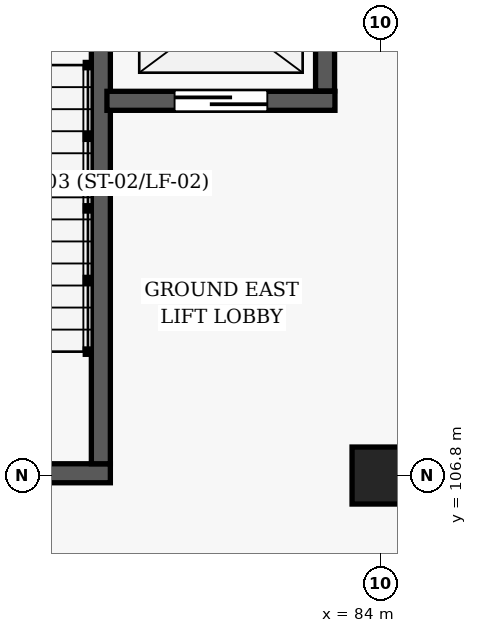
"""IFC4 building model, lengths in metres.
Left out: names, types, materials, properties, quantities, classifications, styles, units other than length and angle.
Written with IfcOpenShell. Run it as: python <this file> out.ifc"""

import sys

from ifc_helpers import new_model, si_unit, direction, frame, frame_2d, origin, origin_2d, place, context, subcontext, project, spatial, rectangle, extrude, element, fill, save


model = new_model("IFC4")
c1 = context("Model", 3, precision=1e-05, world=origin(), true_north=direction((0.0, 1.0)))
c2 = subcontext(c1, "Body", "Model", "MODEL_VIEW")
j1 = project(units=[si_unit("LENGTHUNIT", "METRE"), si_unit("PLANEANGLEUNIT", "RADIAN")], contexts=[c1])
p1 = place(None, origin())
s1 = spatial("IfcSite", under=j1, at=p1, CompositionType="ELEMENT")
p2 = place(p1, origin())
s2 = spatial("IfcBuilding", under=s1, at=p2, CompositionType="ELEMENT")
p3 = place(p2, origin())
s3 = spatial("IfcBuildingStorey", under=s2, at=p3, CompositionType="ELEMENT", Elevation=0.0)
p4 = place(p3, frame((84.0, 106.8, 0.0), z_axis=(0.0, 0.0, 1.0), x_axis=(1.0, 0.0, 0.0)))
e1 = element("IfcColumn", 1, at=p4, inside=s3, PredefinedType="COLUMN", context=c2, shape_type="SweptSolid", body=[
    extrude(rectangle(XDim=0.75, YDim=0.75, at=origin_2d()), origin(), (0.0, 0.0, 1.0), 4.8),
])
p5 = place(p3, frame((80.445, 106.83, 0.0), z_axis=(0.0, 0.0, 1.0), x_axis=(-1.0, 0.0, 0.0)))
e2 = element("IfcWall", 2, at=p5, inside=s3, PredefinedType="SHEAR", context=c2, shape_type="SweptSolid", body=[
    extrude(rectangle(XDim=3.61, YDim=0.25, at=frame_2d((1.805, 0.0))), origin(), (0.0, 0.0, 1.0), 4.56),
])
p6 = place(p5, frame((1.235, 0.0, 0.0)))
e3 = element("IfcOpeningElement", 3, at=p6, cuts=e2, PredefinedType="OPENING", context=c2, shape_type="SweptSolid", body=[
    extrude(rectangle(XDim=1.14, YDim=2.15, at=frame_2d((0.57, 1.075))), frame((0.0, 0.135, 0.0), z_axis=(0.0, -1.0, 0.0), x_axis=(1.0, 0.0, 0.0)), (0.0, 0.0, 1.0), 0.27),
])
p7 = place(p3, frame((80.32, 114.345, 0.0), z_axis=(0.0, 0.0, 1.0), x_axis=(0.0, -1.0, 0.0)))
e4 = element("IfcWall", 4, at=p7, inside=s3, PredefinedType="SHEAR", context=c2, shape_type="SweptSolid", body=[
    extrude(rectangle(XDim=7.39, YDim=0.25, at=frame_2d((3.695, 0.0))), origin(), (0.0, 0.0, 1.0), 4.56),
])
p8 = place(p3, frame((80.4, 111.73, 0.0), z_axis=(0.0, 0.0, 1.0), x_axis=(1.0, 0.0, 0.0)))
e5 = element("IfcWall", 5, at=p8, inside=s3, PredefinedType="SHEAR", context=c2, shape_type="SweptSolid", body=[
    extrude(rectangle(XDim=3.0, YDim=0.25, at=frame_2d((1.5, 0.0))), origin(), (0.0, 0.0, 1.0), 4.56),
])
p9 = place(p8, frame((0.89, 0.0, 0.0)))
e6 = element("IfcOpeningElement", 6, at=p9, cuts=e5, PredefinedType="OPENING", context=c2, shape_type="SweptSolid", body=[
    extrude(rectangle(XDim=1.22, YDim=2.18, at=frame_2d((0.61, 1.09))), frame((0.0, 0.135, 0.0), z_axis=(0.0, -1.0, 0.0), x_axis=(1.0, 0.0, 0.0)), (0.0, 0.0, 1.0), 0.27),
])
p10 = place(p3, frame((83.27, 111.86, 0.0), z_axis=(0.0, 0.0, 1.0), x_axis=(0.0, 1.0, 0.0)))
e7 = element("IfcWall", 7, at=p10, inside=s3, PredefinedType="SHEAR", context=c2, shape_type="SweptSolid", body=[
    extrude(rectangle(XDim=2.08, YDim=0.25, at=frame_2d((1.04, 0.0))), origin(), (0.0, 0.0, 1.0), 4.56),
])
p11 = place(p3, frame((84.2, 106.8, 0.0), z_axis=(0.0, 0.0, 1.0), x_axis=(1.0, 0.0, 0.0)))
e8 = element("IfcWall", 8, at=p11, inside=s3, PredefinedType="PARTITIONING", context=c2, shape_type="SweptSolid", body=[
    extrude(rectangle(XDim=28.53, YDim=0.18, at=frame_2d((14.265, 0.0))), origin(), (0.0, 0.0, 1.0), 3.675),
])
p12 = place(p11, frame((6.033, 0.0, 0.0)))
e9 = element("IfcOpeningElement", 9, at=p12, cuts=e8, PredefinedType="OPENING", context=c2, shape_type="SweptSolid", body=[
    extrude(rectangle(XDim=1.3, YDim=2.2, at=frame_2d((0.65, 1.1))), frame((0.0, 0.1, 0.0), z_axis=(0.0, -1.0, 0.0), x_axis=(1.0, 0.0, 0.0)), (0.0, 0.0, 1.0), 0.2),
])
p13 = place(p11, frame((13.515, 0.0, 0.0)))
e10 = element("IfcOpeningElement", 10, at=p13, cuts=e8, PredefinedType="OPENING", context=c2, shape_type="SweptSolid", body=[
    extrude(rectangle(XDim=1.5, YDim=2.25, at=frame_2d((0.75, 1.125))), frame((0.0, 0.1, 0.0), z_axis=(0.0, -1.0, 0.0), x_axis=(1.0, 0.0, 0.0)), (0.0, 0.0, 1.0), 0.2),
])
p14 = place(p11, frame((20.777, 0.0, 0.0)))
e11 = element("IfcOpeningElement", 11, at=p14, cuts=e8, PredefinedType="OPENING", context=c2, shape_type="SweptSolid", body=[
    extrude(rectangle(XDim=1.24, YDim=2.2, at=frame_2d((0.62, 1.1))), frame((0.0, 0.1, 0.0), z_axis=(0.0, -1.0, 0.0), x_axis=(1.0, 0.0, 0.0)), (0.0, 0.0, 1.0), 0.2),
])
p15 = place(p9, origin())
e12 = element("IfcDoor", 12, at=p15, inside=s3, OperationType="SLIDING_TO_RIGHT", PredefinedType="DOOR", context=c2, shape_type="SweptSolid", body=[
    extrude(rectangle(XDim=1.22, YDim=2.18, at=frame_2d((0.61, 1.09))), frame((0.0, 0.025, 0.0), z_axis=(0.0, -1.0, 0.0), x_axis=(1.0, 0.0, 0.0)), (0.0, 0.0, 1.0), 0.05),
])
fill(e6, e12)
save(model, sys.argv[1])
